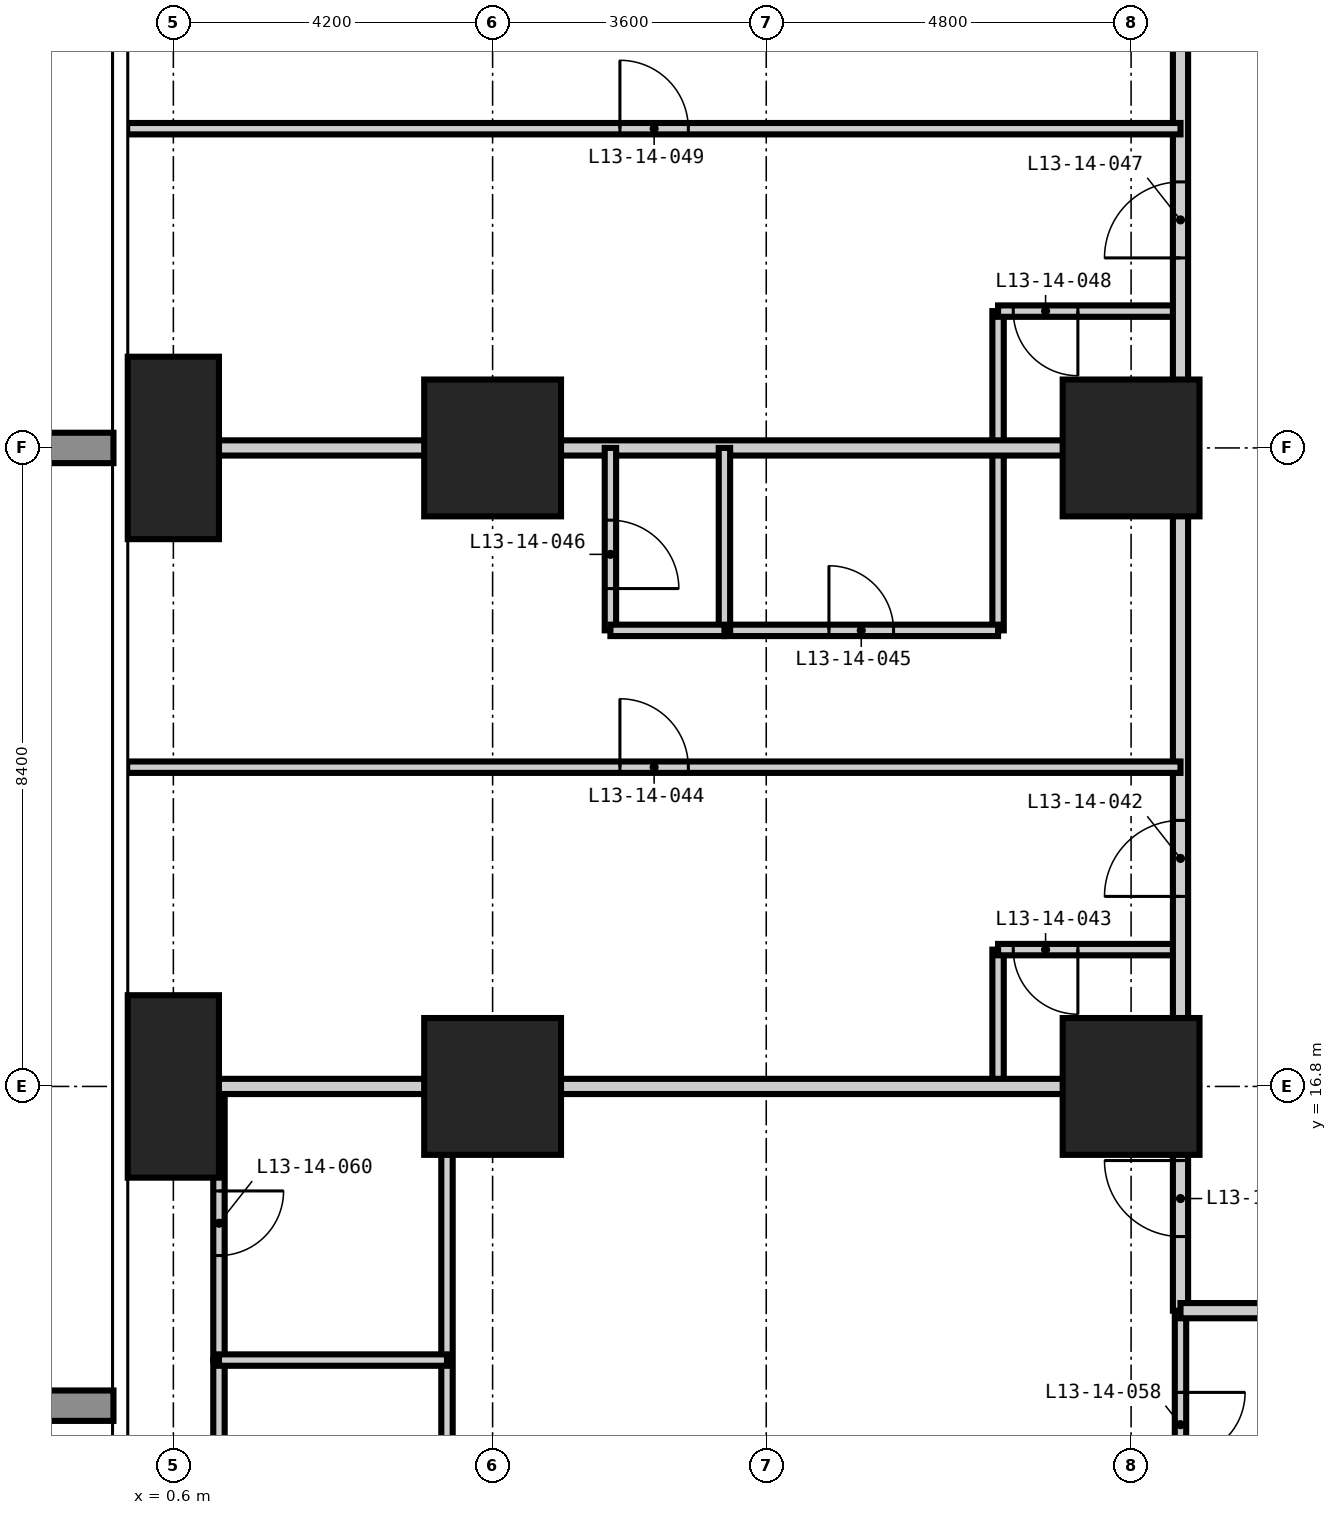
"""IFC4 building model, lengths in metres.
Left out: names, types, materials, properties, quantities, classifications, styles, units other than length and angle.
Written with IfcOpenShell. Run it as: python <this file> out.ifc"""

import sys

from ifc_helpers import new_model, si_unit, direction, frame, frame_2d, origin, origin_2d, place, context, subcontext, project, spatial, rectangle, extrude, element, fill, save


model = new_model("IFC4")
c1 = context("Model", 3, precision=1e-05, world=origin(), true_north=direction((0.0, 1.0)))
c2 = subcontext(c1, "Body", "Model", "MODEL_VIEW")
j1 = project(units=[si_unit("LENGTHUNIT", "METRE"), si_unit("PLANEANGLEUNIT", "RADIAN")], contexts=[c1])
p1 = place(None, origin())
s1 = spatial("IfcSite", under=j1, at=p1, CompositionType="ELEMENT")
p2 = place(p1, origin())
s2 = spatial("IfcBuilding", under=s1, at=p2, CompositionType="ELEMENT")
p3 = place(p2, frame((0.0, 0.0, 55.8)))
s3 = spatial("IfcBuildingStorey", under=s2, at=p3, CompositionType="ELEMENT", Elevation=55.8)
for number, where, z_axis, x_axis in (
    (1, (0.6, 16.8, -0.35), (0.0, 0.0, 1.0), (1.0, 0.0, 0.0)),
    (2, (0.6, 25.2, -0.35), (0.0, 0.0, 1.0), (1.0, 0.0, 0.0)),
):
    element("IfcColumn", number, at=place(p3, frame(where, z_axis=z_axis, x_axis=x_axis)), inside=s3, PredefinedType="COLUMN", context=c2, shape_type="SweptSolid", body=[
        extrude(rectangle(XDim=1.2, YDim=2.4, at=origin_2d()), origin(), (0.0, 0.0, 1.0), 3.6),
    ])
for number, where, z_axis, x_axis in (
    (3, (4.8, 16.8, -0.35), (0.0, 0.0, 1.0), (1.0, 0.0, 0.0)),
    (4, (4.8, 25.2, -0.35), (0.0, 0.0, 1.0), (1.0, 0.0, 0.0)),
    (5, (13.2, 16.8, -0.35), (0.0, 0.0, 1.0), (1.0, 0.0, 0.0)),
    (6, (13.2, 25.2, -0.35), (0.0, 0.0, 1.0), (1.0, 0.0, 0.0)),
):
    element("IfcColumn", number, at=place(p3, frame(where, z_axis=z_axis, x_axis=x_axis)), inside=s3, PredefinedType="COLUMN", context=c2, shape_type="SweptSolid", body=[
        extrude(rectangle(XDim=1.8, YDim=1.8, at=origin_2d()), origin(), (0.0, 0.0, 1.0), 3.6),
    ])
p4 = place(p3, frame((1.2, 13.2, 0.0), z_axis=(0.0, 0.0, 1.0), x_axis=(0.0, 1.0, 0.0)))
e7 = element("IfcWall", 7, at=p4, inside=s3, PredefinedType="PARTITIONING", context=c2, shape_type="SweptSolid", body=[
    extrude(rectangle(XDim=3.6, YDim=0.15, at=frame_2d((1.8, 0.0))), origin(), (0.0, 0.0, 1.0), 3.25),
])
p5 = place(p4, frame((1.375, 0.0, 0.0)))
e8 = element("IfcOpeningElement", 8, at=p5, cuts=e7, PredefinedType="OPENING", context=c2, shape_type="SweptSolid", body=[
    extrude(rectangle(XDim=0.85, YDim=2.1, at=frame_2d((0.425, 1.05))), frame((0.0, 0.085, 0.0), z_axis=(0.0, -1.0, 0.0), x_axis=(1.0, 0.0, 0.0)), (0.0, 0.0, 1.0), 0.17),
])
p6 = place(p3, frame((11.45, 16.8, 0.0), z_axis=(0.0, 0.0, 1.0), x_axis=(0.0, 1.0, 0.0)))
e9 = element("IfcWall", 9, at=p6, inside=s3, PredefinedType="PARTITIONING", context=c2, shape_type="SweptSolid", body=[
    extrude(rectangle(XDim=1.8, YDim=0.15, at=frame_2d((0.9, 0.0))), origin(), (0.0, 0.0, 1.0), 3.25),
])
p7 = place(p3, frame((11.45, 22.8, 0.0), z_axis=(0.0, 0.0, 1.0), x_axis=(0.0, 1.0, 0.0)))
e10 = element("IfcWall", 10, at=p7, inside=s3, PredefinedType="PARTITIONING", context=c2, shape_type="SweptSolid", body=[
    extrude(rectangle(XDim=4.2, YDim=0.15, at=frame_2d((2.1, 0.0))), origin(), (0.0, 0.0, 1.0), 3.25),
])
p8 = place(p3, frame((13.85, 10.85, 0.0), z_axis=(0.0, 0.0, 1.0), x_axis=(0.0, 1.0, 0.0)))
e11 = element("IfcWall", 11, at=p8, inside=s3, PredefinedType="PARTITIONING", context=c2, shape_type="SweptSolid", body=[
    extrude(rectangle(XDim=3.0, YDim=0.15, at=frame_2d((1.5, 0.0))), origin(), (0.0, 0.0, 1.0), 3.25),
])
p9 = place(p8, frame((1.075, 0.0, 0.0)))
e12 = element("IfcOpeningElement", 12, at=p9, cuts=e11, PredefinedType="OPENING", context=c2, shape_type="SweptSolid", body=[
    extrude(rectangle(XDim=0.85, YDim=2.1, at=frame_2d((0.425, 1.05))), frame((0.0, 0.085, 0.0), z_axis=(0.0, -1.0, 0.0), x_axis=(1.0, 0.0, 0.0)), (0.0, 0.0, 1.0), 0.17),
])
p10 = place(p3, frame((11.45, 18.6, 0.0), z_axis=(0.0, 0.0, 1.0), x_axis=(1.0, 0.0, 0.0)))
e13 = element("IfcWall", 13, at=p10, inside=s3, PredefinedType="PARTITIONING", context=c2, shape_type="SweptSolid", body=[
    extrude(rectangle(XDim=2.4, YDim=0.15, at=frame_2d((1.2, 0.0))), origin(), (0.0, 0.0, 1.0), 3.25),
])
p11 = place(p10, frame((0.2, 0.0, 0.0)))
e14 = element("IfcOpeningElement", 14, at=p11, cuts=e13, PredefinedType="OPENING", context=c2, shape_type="SweptSolid", body=[
    extrude(rectangle(XDim=0.85, YDim=2.1, at=frame_2d((0.425, 1.05))), frame((0.0, 0.085, 0.0), z_axis=(0.0, -1.0, 0.0), x_axis=(1.0, 0.0, 0.0)), (0.0, 0.0, 1.0), 0.17),
])
p12 = place(p3, frame((7.85, 22.8, 0.0), z_axis=(0.0, 0.0, 1.0), x_axis=(1.0, 0.0, 0.0)))
e15 = element("IfcWall", 15, at=p12, inside=s3, PredefinedType="PARTITIONING", context=c2, shape_type="SweptSolid", body=[
    extrude(rectangle(XDim=3.6, YDim=0.15, at=frame_2d((1.8, 0.0))), origin(), (0.0, 0.0, 1.0), 3.25),
])
p13 = place(p12, frame((1.375, 0.0, 0.0)))
e16 = element("IfcOpeningElement", 16, at=p13, cuts=e15, PredefinedType="OPENING", context=c2, shape_type="SweptSolid", body=[
    extrude(rectangle(XDim=0.85, YDim=2.1, at=frame_2d((0.425, 1.05))), frame((0.0, 0.085, 0.0), z_axis=(0.0, -1.0, 0.0), x_axis=(1.0, 0.0, 0.0)), (0.0, 0.0, 1.0), 0.17),
])
p14 = place(p3, frame((11.45, 27.0, 0.0), z_axis=(0.0, 0.0, 1.0), x_axis=(1.0, 0.0, 0.0)))
e17 = element("IfcWall", 17, at=p14, inside=s3, PredefinedType="PARTITIONING", context=c2, shape_type="SweptSolid", body=[
    extrude(rectangle(XDim=2.4, YDim=0.15, at=frame_2d((1.2, 0.0))), origin(), (0.0, 0.0, 1.0), 3.25),
])
p15 = place(p14, frame((0.2, 0.0, 0.0)))
e18 = element("IfcOpeningElement", 18, at=p15, cuts=e17, PredefinedType="OPENING", context=c2, shape_type="SweptSolid", body=[
    extrude(rectangle(XDim=0.85, YDim=2.1, at=frame_2d((0.425, 1.05))), frame((0.0, 0.085, 0.0), z_axis=(0.0, -1.0, 0.0), x_axis=(1.0, 0.0, 0.0)), (0.0, 0.0, 1.0), 0.17),
])
p16 = place(p3, frame((13.85, 13.85, 0.0), z_axis=(0.0, 0.0, 1.0), x_axis=(0.0, 1.0, 0.0)))
e19 = element("IfcWall", 19, at=p16, inside=s3, PredefinedType="PARTITIONING", context=c2, shape_type="SweptSolid", body=[
    extrude(rectangle(XDim=32.3, YDim=0.2, at=frame_2d((16.15, 0.0))), origin(), (0.0, 0.0, 1.0), 3.25),
])
p17 = place(p16, frame((5.45, 0.0, 0.0)))
e20 = element("IfcOpeningElement", 20, at=p17, cuts=e19, PredefinedType="OPENING", context=c2, shape_type="SweptSolid", body=[
    extrude(rectangle(XDim=1.0, YDim=2.2, at=frame_2d((0.5, 1.1))), frame((0.0, 0.11, 0.0), z_axis=(0.0, -1.0, 0.0), x_axis=(1.0, 0.0, 0.0)), (0.0, 0.0, 1.0), 0.22),
])
p18 = place(p16, frame((13.85, 0.0, 0.0)))
e21 = element("IfcOpeningElement", 21, at=p18, cuts=e19, PredefinedType="OPENING", context=c2, shape_type="SweptSolid", body=[
    extrude(rectangle(XDim=1.0, YDim=2.2, at=frame_2d((0.5, 1.1))), frame((0.0, 0.11, 0.0), z_axis=(0.0, -1.0, 0.0), x_axis=(1.0, 0.0, 0.0)), (0.0, 0.0, 1.0), 0.22),
])
p19 = place(p16, frame((22.25, 0.0, 0.0)))
e22 = element("IfcOpeningElement", 22, at=p19, cuts=e19, PredefinedType="OPENING", context=c2, shape_type="SweptSolid", body=[
    extrude(rectangle(XDim=1.0, YDim=2.2, at=frame_2d((0.5, 1.1))), frame((0.0, 0.11, 0.0), z_axis=(0.0, -1.0, 0.0), x_axis=(1.0, 0.0, 0.0)), (0.0, 0.0, 1.0), 0.22),
])
p20 = place(p16, frame((0.975, 0.0, 0.0)))
e23 = element("IfcOpeningElement", 23, at=p20, cuts=e19, PredefinedType="OPENING", context=c2, shape_type="SweptSolid", body=[
    extrude(rectangle(XDim=1.0, YDim=2.2, at=frame_2d((0.5, 1.1))), frame((0.0, 0.11, 0.0), z_axis=(0.0, -1.0, 0.0), x_axis=(1.0, 0.0, 0.0)), (0.0, 0.0, 1.0), 0.22),
])
p21 = place(p16, frame((29.725, 0.0, 0.0)))
e24 = element("IfcOpeningElement", 24, at=p21, cuts=e19, PredefinedType="OPENING", context=c2, shape_type="SweptSolid", body=[
    extrude(rectangle(XDim=1.0, YDim=2.2, at=frame_2d((0.5, 1.1))), frame((0.0, 0.11, 0.0), z_axis=(0.0, -1.0, 0.0), x_axis=(1.0, 0.0, 0.0)), (0.0, 0.0, 1.0), 0.22),
])
p22 = place(p3, frame((45.55, 13.85, 0.0), z_axis=(0.0, 0.0, 1.0), x_axis=(-1.0, 0.0, 0.0)))
e25 = element("IfcWall", 25, at=p22, inside=s3, PredefinedType="PARTITIONING", context=c2, shape_type="SweptSolid", body=[
    extrude(rectangle(XDim=31.7, YDim=0.2, at=frame_2d((15.85, 0.0))), origin(), (0.0, 0.0, 1.0), 3.25),
])
p23 = place(p22, frame((24.05, 0.0, 0.0)))
e26 = element("IfcOpeningElement", 26, at=p23, cuts=e25, PredefinedType="OPENING", context=c2, shape_type="SweptSolid", body=[
    extrude(rectangle(XDim=1.0, YDim=2.2, at=frame_2d((0.5, 1.1))), frame((0.0, 0.11, 0.0), z_axis=(0.0, -1.0, 0.0), x_axis=(1.0, 0.0, 0.0)), (0.0, 0.0, 1.0), 0.22),
])
p24 = place(p22, frame((15.65, 0.0, 0.0)))
e27 = element("IfcOpeningElement", 27, at=p24, cuts=e25, PredefinedType="OPENING", context=c2, shape_type="SweptSolid", body=[
    extrude(rectangle(XDim=1.0, YDim=2.2, at=frame_2d((0.5, 1.1))), frame((0.0, 0.11, 0.0), z_axis=(0.0, -1.0, 0.0), x_axis=(1.0, 0.0, 0.0)), (0.0, 0.0, 1.0), 0.22),
])
p25 = place(p22, frame((7.25, 0.0, 0.0)))
e28 = element("IfcOpeningElement", 28, at=p25, cuts=e25, PredefinedType="OPENING", context=c2, shape_type="SweptSolid", body=[
    extrude(rectangle(XDim=1.0, YDim=2.2, at=frame_2d((0.5, 1.1))), frame((0.0, 0.11, 0.0), z_axis=(0.0, -1.0, 0.0), x_axis=(1.0, 0.0, 0.0)), (0.0, 0.0, 1.0), 0.22),
])
for number, where, z_axis, x_axis in (
    (29, (-0.008, 16.8, 0.0), (0.0, 0.0, 1.0), (1.0, 0.0, 0.0)),
    (30, (-0.008, 25.2, 0.0), (0.0, 0.0, 1.0), (1.0, 0.0, 0.0)),
):
    element("IfcWall", number, at=place(p3, frame(where, z_axis=z_axis, x_axis=x_axis)), inside=s3, PredefinedType="PARTITIONING", context=c2, shape_type="SweptSolid", body=[
        extrude(rectangle(XDim=13.858, YDim=0.2, at=frame_2d((6.929, 0.0))), origin(), (0.0, 0.0, 1.0), 3.25),
    ])
p26 = place(p3, frame((1.2, 10.8, 0.0), z_axis=(0.0, 0.0, 1.0), x_axis=(0.0, 1.0, 0.0)))
e31 = element("IfcWall", 31, at=p26, inside=s3, PredefinedType="PARTITIONING", context=c2, shape_type="SweptSolid", body=[
    extrude(rectangle(XDim=2.4, YDim=0.15, at=frame_2d((1.2, 0.0))), origin(), (0.0, 0.0, 1.0), 3.25),
])
p27 = place(p3, frame((4.2, -0.008, 0.0), z_axis=(0.0, 0.0, 1.0), x_axis=(0.0, 1.0, 0.0)))
e32 = element("IfcWall", 32, at=p27, inside=s3, PredefinedType="PARTITIONING", context=c2, shape_type="SweptSolid", body=[
    extrude(rectangle(XDim=16.808, YDim=0.15, at=frame_2d((8.404, 0.0))), origin(), (0.0, 0.0, 1.0), 3.25),
])
p28 = place(p27, frame((4.958, 0.0, 0.0)))
e33 = element("IfcOpeningElement", 33, at=p28, cuts=e32, PredefinedType="OPENING", context=c2, shape_type="SweptSolid", body=[
    extrude(rectangle(XDim=0.9, YDim=2.1, at=frame_2d((0.45, 1.05))), frame((0.0, 0.085, 0.0), z_axis=(0.0, -1.0, 0.0), x_axis=(1.0, 0.0, 0.0)), (0.0, 0.0, 1.0), 0.17),
])
p29 = place(p3, frame((6.35, 22.8, 0.0), z_axis=(0.0, 0.0, 1.0), x_axis=(0.0, 1.0, 0.0)))
e34 = element("IfcWall", 34, at=p29, inside=s3, PredefinedType="PARTITIONING", context=c2, shape_type="SweptSolid", body=[
    extrude(rectangle(XDim=2.4, YDim=0.15, at=frame_2d((1.2, 0.0))), origin(), (0.0, 0.0, 1.0), 3.25),
])
p30 = place(p29, frame((0.55, 0.0, 0.0)))
e35 = element("IfcOpeningElement", 35, at=p30, cuts=e34, PredefinedType="OPENING", context=c2, shape_type="SweptSolid", body=[
    extrude(rectangle(XDim=0.9, YDim=2.1, at=frame_2d((0.45, 1.05))), frame((0.0, 0.085, 0.0), z_axis=(0.0, -1.0, 0.0), x_axis=(1.0, 0.0, 0.0)), (0.0, 0.0, 1.0), 0.17),
])
p31 = place(p3, frame((7.85, 22.8, 0.0), z_axis=(0.0, 0.0, 1.0), x_axis=(0.0, 1.0, 0.0)))
e36 = element("IfcWall", 36, at=p31, inside=s3, PredefinedType="PARTITIONING", context=c2, shape_type="SweptSolid", body=[
    extrude(rectangle(XDim=2.4, YDim=0.15, at=frame_2d((1.2, 0.0))), origin(), (0.0, 0.0, 1.0), 3.25),
])
p32 = place(p3, frame((1.2, 13.2, 0.0), z_axis=(0.0, 0.0, 1.0), x_axis=(1.0, 0.0, 0.0)))
e37 = element("IfcWall", 37, at=p32, inside=s3, PredefinedType="PARTITIONING", context=c2, shape_type="SweptSolid", body=[
    extrude(rectangle(XDim=3.0, YDim=0.15, at=frame_2d((1.5, 0.0))), origin(), (0.0, 0.0, 1.0), 3.25),
])
p33 = place(p3, frame((-0.008, 21.0, 0.0), z_axis=(0.0, 0.0, 1.0), x_axis=(1.0, 0.0, 0.0)))
e38 = element("IfcWall", 38, at=p33, inside=s3, PredefinedType="PARTITIONING", context=c2, shape_type="SweptSolid", body=[
    extrude(rectangle(XDim=13.858, YDim=0.15, at=frame_2d((6.929, 0.0))), origin(), (0.0, 0.0, 1.0), 3.25),
])
p34 = place(p33, frame((6.483, 0.0, 0.0)))
e39 = element("IfcOpeningElement", 39, at=p34, cuts=e38, PredefinedType="OPENING", context=c2, shape_type="SweptSolid", body=[
    extrude(rectangle(XDim=0.9, YDim=2.1, at=frame_2d((0.45, 1.05))), frame((0.0, 0.085, 0.0), z_axis=(0.0, -1.0, 0.0), x_axis=(1.0, 0.0, 0.0)), (0.0, 0.0, 1.0), 0.17),
])
p35 = place(p3, frame((6.35, 22.8, 0.0), z_axis=(0.0, 0.0, 1.0), x_axis=(1.0, 0.0, 0.0)))
e40 = element("IfcWall", 40, at=p35, inside=s3, PredefinedType="PARTITIONING", context=c2, shape_type="SweptSolid", body=[
    extrude(rectangle(XDim=1.5, YDim=0.15, at=frame_2d((0.75, 0.0))), origin(), (0.0, 0.0, 1.0), 3.25),
])
p36 = place(p3, frame((-0.008, 29.4, 0.0), z_axis=(0.0, 0.0, 1.0), x_axis=(1.0, 0.0, 0.0)))
e41 = element("IfcWall", 41, at=p36, inside=s3, PredefinedType="PARTITIONING", context=c2, shape_type="SweptSolid", body=[
    extrude(rectangle(XDim=13.858, YDim=0.15, at=frame_2d((6.929, 0.0))), origin(), (0.0, 0.0, 1.0), 3.25),
])
p37 = place(p36, frame((6.483, 0.0, 0.0)))
e42 = element("IfcOpeningElement", 42, at=p37, cuts=e41, PredefinedType="OPENING", context=c2, shape_type="SweptSolid", body=[
    extrude(rectangle(XDim=0.9, YDim=2.1, at=frame_2d((0.45, 1.05))), frame((0.0, 0.085, 0.0), z_axis=(0.0, -1.0, 0.0), x_axis=(1.0, 0.0, 0.0)), (0.0, 0.0, 1.0), 0.17),
])
p38 = place(p17, origin())
e43 = element("IfcDoor", 43, at=p38, inside=s3, OperationType="SINGLE_SWING_LEFT", PredefinedType="DOOR", context=c2, shape_type="SweptSolid", body=[
    extrude(rectangle(XDim=1.0, YDim=2.2, at=frame_2d((0.5, 1.1))), frame((0.0, 0.025, 0.0), z_axis=(0.0, -1.0, 0.0), x_axis=(1.0, 0.0, 0.0)), (0.0, 0.0, 1.0), 0.05),
])
fill(e20, e43)
p39 = place(p11, frame((0.85, 0.0, 0.0), z_axis=(0.0, 0.0, 1.0), x_axis=(-1.0, 0.0, 0.0)))
e44 = element("IfcDoor", 44, at=p39, inside=s3, OperationType="SINGLE_SWING_LEFT", PredefinedType="DOOR", context=c2, shape_type="SweptSolid", body=[
    extrude(rectangle(XDim=0.85, YDim=2.1, at=frame_2d((0.425, 1.05))), frame((0.0, 0.025, 0.0), z_axis=(0.0, -1.0, 0.0), x_axis=(1.0, 0.0, 0.0)), (0.0, 0.0, 1.0), 0.05),
])
fill(e14, e44)
p40 = place(p34, origin())
e45 = element("IfcDoor", 45, at=p40, inside=s3, OperationType="SINGLE_SWING_LEFT", PredefinedType="DOOR", context=c2, shape_type="SweptSolid", body=[
    extrude(rectangle(XDim=0.9, YDim=2.1, at=frame_2d((0.45, 1.05))), frame((0.0, 0.025, 0.0), z_axis=(0.0, -1.0, 0.0), x_axis=(1.0, 0.0, 0.0)), (0.0, 0.0, 1.0), 0.05),
])
fill(e39, e45)
p41 = place(p13, origin())
e46 = element("IfcDoor", 46, at=p41, inside=s3, OperationType="SINGLE_SWING_LEFT", PredefinedType="DOOR", context=c2, shape_type="SweptSolid", body=[
    extrude(rectangle(XDim=0.85, YDim=2.1, at=frame_2d((0.425, 1.05))), frame((0.0, 0.025, 0.0), z_axis=(0.0, -1.0, 0.0), x_axis=(1.0, 0.0, 0.0)), (0.0, 0.0, 1.0), 0.05),
])
fill(e16, e46)
p42 = place(p30, frame((0.9, 0.0, 0.0), z_axis=(0.0, 0.0, 1.0), x_axis=(-1.0, 0.0, 0.0)))
e47 = element("IfcDoor", 47, at=p42, inside=s3, OperationType="SINGLE_SWING_RIGHT", PredefinedType="DOOR", context=c2, shape_type="SweptSolid", body=[
    extrude(rectangle(XDim=0.9, YDim=2.1, at=frame_2d((0.45, 1.05))), frame((0.0, 0.025, 0.0), z_axis=(0.0, -1.0, 0.0), x_axis=(1.0, 0.0, 0.0)), (0.0, 0.0, 1.0), 0.05),
])
fill(e35, e47)
p43 = place(p18, origin())
e48 = element("IfcDoor", 48, at=p43, inside=s3, OperationType="SINGLE_SWING_LEFT", PredefinedType="DOOR", context=c2, shape_type="SweptSolid", body=[
    extrude(rectangle(XDim=1.0, YDim=2.2, at=frame_2d((0.5, 1.1))), frame((0.0, 0.025, 0.0), z_axis=(0.0, -1.0, 0.0), x_axis=(1.0, 0.0, 0.0)), (0.0, 0.0, 1.0), 0.05),
])
fill(e21, e48)
p44 = place(p15, frame((0.85, 0.0, 0.0), z_axis=(0.0, 0.0, 1.0), x_axis=(-1.0, 0.0, 0.0)))
e49 = element("IfcDoor", 49, at=p44, inside=s3, OperationType="SINGLE_SWING_LEFT", PredefinedType="DOOR", context=c2, shape_type="SweptSolid", body=[
    extrude(rectangle(XDim=0.85, YDim=2.1, at=frame_2d((0.425, 1.05))), frame((0.0, 0.025, 0.0), z_axis=(0.0, -1.0, 0.0), x_axis=(1.0, 0.0, 0.0)), (0.0, 0.0, 1.0), 0.05),
])
fill(e18, e49)
p45 = place(p37, origin())
e50 = element("IfcDoor", 50, at=p45, inside=s3, OperationType="SINGLE_SWING_LEFT", PredefinedType="DOOR", context=c2, shape_type="SweptSolid", body=[
    extrude(rectangle(XDim=0.9, YDim=2.1, at=frame_2d((0.45, 1.05))), frame((0.0, 0.025, 0.0), z_axis=(0.0, -1.0, 0.0), x_axis=(1.0, 0.0, 0.0)), (0.0, 0.0, 1.0), 0.05),
])
fill(e42, e50)
p46 = place(p20, origin())
e51 = element("IfcDoor", 51, at=p46, inside=s3, OperationType="SINGLE_SWING_RIGHT", PredefinedType="DOOR", context=c2, shape_type="SweptSolid", body=[
    extrude(rectangle(XDim=1.0, YDim=2.2, at=frame_2d((0.5, 1.1))), frame((0.0, 0.025, 0.0), z_axis=(0.0, -1.0, 0.0), x_axis=(1.0, 0.0, 0.0)), (0.0, 0.0, 1.0), 0.05),
])
fill(e23, e51)
p47 = place(p9, frame((0.85, 0.0, 0.0), z_axis=(0.0, 0.0, 1.0), x_axis=(-1.0, 0.0, 0.0)))
e52 = element("IfcDoor", 52, at=p47, inside=s3, OperationType="SINGLE_SWING_LEFT", PredefinedType="DOOR", context=c2, shape_type="SweptSolid", body=[
    extrude(rectangle(XDim=0.85, YDim=2.1, at=frame_2d((0.425, 1.05))), frame((0.0, 0.025, 0.0), z_axis=(0.0, -1.0, 0.0), x_axis=(1.0, 0.0, 0.0)), (0.0, 0.0, 1.0), 0.05),
])
fill(e12, e52)
p48 = place(p5, frame((0.85, 0.0, 0.0), z_axis=(0.0, 0.0, 1.0), x_axis=(-1.0, 0.0, 0.0)))
e53 = element("IfcDoor", 53, at=p48, inside=s3, OperationType="SINGLE_SWING_LEFT", PredefinedType="DOOR", context=c2, shape_type="SweptSolid", body=[
    extrude(rectangle(XDim=0.85, YDim=2.1, at=frame_2d((0.425, 1.05))), frame((0.0, 0.025, 0.0), z_axis=(0.0, -1.0, 0.0), x_axis=(1.0, 0.0, 0.0)), (0.0, 0.0, 1.0), 0.05),
])
fill(e8, e53)
save(model, sys.argv[1])
